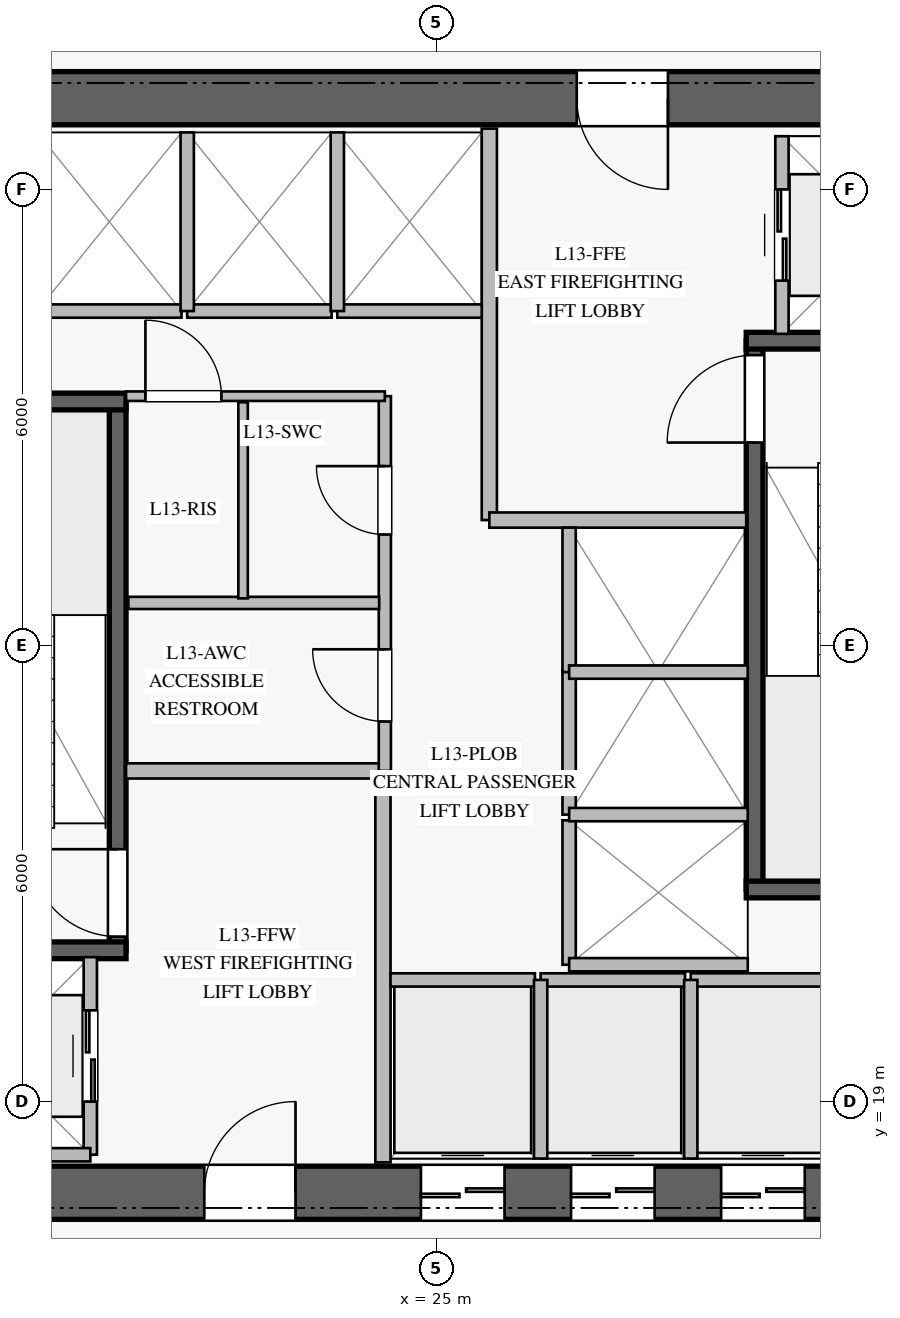
"""IFC4 building model, lengths in metres.
Left out: names, types, materials, properties, quantities, classifications, styles, units other than length and angle.
Written with IfcOpenShell. Run it as: python <this file> out.ifc"""

import sys

from ifc_helpers import new_model, si_unit, direction, frame, frame_2d, origin, place, context, subcontext, project, spatial, rectangle, extrude, element, fill, save


model = new_model("IFC4")
c1 = context("Model", 3, precision=1e-05, world=origin(), true_north=direction((0.0, 1.0)))
c2 = subcontext(c1, "Body", "Model", "MODEL_VIEW")
j1 = project(units=[si_unit("LENGTHUNIT", "METRE"), si_unit("PLANEANGLEUNIT", "RADIAN")], contexts=[c1])
p1 = place(None, origin())
s1 = spatial("IfcSite", under=j1, at=p1, CompositionType="ELEMENT")
p2 = place(p1, origin())
s2 = spatial("IfcBuilding", under=s1, at=p2, CompositionType="ELEMENT")
p3 = place(p2, frame((0.0, 0.0, 56.0)))
s3 = spatial("IfcBuildingStorey", under=s2, at=p3, CompositionType="ELEMENT", Elevation=56.0)
p4 = place(p3, frame((16.85, 17.8, 0.0), z_axis=(0.0, 0.0, 1.0), x_axis=(1.0, 0.0, 0.0)))
e1 = element("IfcWall", 1, at=p4, inside=s3, PredefinedType="SHEAR", context=c2, shape_type="SweptSolid", body=[
    extrude(rectangle(XDim=16.3, YDim=0.7, at=frame_2d((8.15, 0.0))), origin(), (0.0, 0.0, 1.0), 3.76),
])
p5 = place(p4, frame((5.1, 0.0, 0.0)))
e2 = element("IfcOpeningElement", 2, at=p5, cuts=e1, PredefinedType="OPENING", context=c2, shape_type="SweptSolid", body=[
    extrude(rectangle(XDim=1.2, YDim=2.25, at=frame_2d((0.6, 1.125))), frame((0.0, 0.36, 0.0), z_axis=(0.0, -1.0, 0.0), x_axis=(1.0, 0.0, 0.0)), (0.0, 0.0, 1.0), 0.72),
])
p6 = place(p4, frame((14.05, 0.0, 0.0)))
e3 = element("IfcOpeningElement", 3, at=p6, cuts=e1, PredefinedType="OPENING", context=c2, shape_type="SweptSolid", body=[
    extrude(rectangle(XDim=0.9, YDim=2.1, at=frame_2d((0.45, 1.05))), frame((0.0, 0.36, 0.0), z_axis=(0.0, -1.0, 0.0), x_axis=(1.0, 0.0, 0.0)), (0.0, 0.0, 1.0), 0.72),
])
p7 = place(p4, frame((7.95, 0.0, 0.0)))
e4 = element("IfcOpeningElement", 4, at=p7, cuts=e1, PredefinedType="OPENING", context=c2, shape_type="SweptSolid", body=[
    extrude(rectangle(XDim=1.1, YDim=2.2, at=frame_2d((0.55, 1.1))), frame((0.0, 0.36, 0.0), z_axis=(0.0, -1.0, 0.0), x_axis=(1.0, 0.0, 0.0)), (0.0, 0.0, 1.0), 0.72),
])
p8 = place(p4, frame((9.925, 0.0, 0.0)))
e5 = element("IfcOpeningElement", 5, at=p8, cuts=e1, PredefinedType="OPENING", context=c2, shape_type="SweptSolid", body=[
    extrude(rectangle(XDim=1.1, YDim=2.2, at=frame_2d((0.55, 1.1))), frame((0.0, 0.36, 0.0), z_axis=(0.0, -1.0, 0.0), x_axis=(1.0, 0.0, 0.0)), (0.0, 0.0, 1.0), 0.72),
])
p9 = place(p4, frame((11.9, 0.0, 0.0)))
e6 = element("IfcOpeningElement", 6, at=p9, cuts=e1, PredefinedType="OPENING", context=c2, shape_type="SweptSolid", body=[
    extrude(rectangle(XDim=1.1, YDim=2.2, at=frame_2d((0.55, 1.1))), frame((0.0, 0.36, 0.0), z_axis=(0.0, -1.0, 0.0), x_axis=(1.0, 0.0, 0.0)), (0.0, 0.0, 1.0), 0.72),
])
p10 = place(p3, frame((33.15, 32.2, 0.0), z_axis=(0.0, 0.0, 1.0), x_axis=(-1.0, 0.0, 0.0)))
e7 = element("IfcWall", 7, at=p10, inside=s3, PredefinedType="SHEAR", context=c2, shape_type="SweptSolid", body=[
    extrude(rectangle(XDim=16.3, YDim=0.7, at=frame_2d((8.15, 0.0))), origin(), (0.0, 0.0, 1.0), 3.76),
])
p11 = place(p10, frame((5.1, 0.0, 0.0)))
e8 = element("IfcOpeningElement", 8, at=p11, cuts=e7, PredefinedType="OPENING", context=c2, shape_type="SweptSolid", body=[
    extrude(rectangle(XDim=1.2, YDim=2.25, at=frame_2d((0.6, 1.125))), frame((0.0, 0.36, 0.0), z_axis=(0.0, -1.0, 0.0), x_axis=(1.0, 0.0, 0.0)), (0.0, 0.0, 1.0), 0.72),
])
p12 = place(p3, frame((20.81, 20.99, 0.0), z_axis=(0.0, 0.0, 1.0), x_axis=(0.0, 1.0, 0.0)))
e9 = element("IfcWall", 9, at=p12, inside=s3, PredefinedType="SOLIDWALL", context=c2, shape_type="SweptSolid", body=[
    extrude(rectangle(XDim=7.22, YDim=0.22, at=frame_2d((3.61, 0.0))), origin(), (0.0, 0.0, 1.0), 3.76),
])
p13 = place(p12, frame((0.18, 0.0, 0.0)))
e10 = element("IfcOpeningElement", 10, at=p13, cuts=e9, PredefinedType="OPENING", context=c2, shape_type="SweptSolid", body=[
    extrude(rectangle(XDim=1.15, YDim=2.2, at=frame_2d((0.575, 1.1))), frame((0.0, 0.12, 0.0), z_axis=(0.0, -1.0, 0.0), x_axis=(1.0, 0.0, 0.0)), (0.0, 0.0, 1.0), 0.24),
])
for number, where, z_axis, x_axis in (
    (11, (17.2, 20.99, 0.0), (0.0, 0.0, 1.0), (1.0, 0.0, 0.0)),
    (12, (17.2, 28.21, 0.0), (0.0, 0.0, 1.0), (1.0, 0.0, 0.0)),
):
    element("IfcWall", number, at=place(p3, frame(where, z_axis=z_axis, x_axis=x_axis)), inside=s3, PredefinedType="SOLIDWALL", context=c2, shape_type="SweptSolid", body=[
        extrude(rectangle(XDim=3.72, YDim=0.22, at=frame_2d((1.86, 0.0))), origin(), (0.0, 0.0, 1.0), 3.76),
    ])
p14 = place(p3, frame((29.19, 21.79, 0.0), z_axis=(0.0, 0.0, 1.0), x_axis=(0.0, 1.0, 0.0)))
e13 = element("IfcWall", 13, at=p14, inside=s3, PredefinedType="SOLIDWALL", context=c2, shape_type="SweptSolid", body=[
    extrude(rectangle(XDim=7.22, YDim=0.22, at=frame_2d((3.61, 0.0))), origin(), (0.0, 0.0, 1.0), 3.76),
])
p15 = place(p14, frame((5.88, 0.0, 0.0)))
e14 = element("IfcOpeningElement", 14, at=p15, cuts=e13, PredefinedType="OPENING", context=c2, shape_type="SweptSolid", body=[
    extrude(rectangle(XDim=1.15, YDim=2.2, at=frame_2d((0.575, 1.1))), frame((0.0, 0.12, 0.0), z_axis=(0.0, -1.0, 0.0), x_axis=(1.0, 0.0, 0.0)), (0.0, 0.0, 1.0), 0.24),
])
for number, where, z_axis, x_axis in (
    (15, (29.08, 21.79, 0.0), (0.0, 0.0, 1.0), (1.0, 0.0, 0.0)),
    (16, (29.08, 29.01, 0.0), (0.0, 0.0, 1.0), (1.0, 0.0, 0.0)),
):
    element("IfcWall", number, at=place(p3, frame(where, z_axis=z_axis, x_axis=x_axis)), inside=s3, PredefinedType="SOLIDWALL", context=c2, shape_type="SweptSolid", body=[
        extrude(rectangle(XDim=3.72, YDim=0.22, at=frame_2d((1.86, 0.0))), origin(), (0.0, 0.0, 1.0), 3.76),
    ])
p16 = place(p3, frame((24.3, 18.2, 0.0), z_axis=(0.0, 0.0, 1.0), x_axis=(0.0, 1.0, 0.0)))
e17 = element("IfcWall", 17, at=p16, inside=s3, PredefinedType="PARTITIONING", context=c2, shape_type="SweptSolid", body=[
    extrude(rectangle(XDim=5.15, YDim=0.2, at=frame_2d((2.575, 0.0))), origin(), (0.0, 0.0, 1.0), 3.76),
])
p17 = place(p3, frame((20.92, 23.35, 0.0), z_axis=(0.0, 0.0, 1.0), x_axis=(1.0, 0.0, 0.0)))
e18 = element("IfcWall", 18, at=p17, inside=s3, PredefinedType="PARTITIONING", context=c2, shape_type="SweptSolid", body=[
    extrude(rectangle(XDim=3.38, YDim=0.2, at=frame_2d((1.69, 0.0))), origin(), (0.0, 0.0, 1.0), 3.76),
])
p18 = place(p3, frame((25.7, 26.65, 0.0), z_axis=(0.0, 0.0, 1.0), x_axis=(0.0, 1.0, 0.0)))
e19 = element("IfcWall", 19, at=p18, inside=s3, PredefinedType="PARTITIONING", context=c2, shape_type="SweptSolid", body=[
    extrude(rectangle(XDim=5.15, YDim=0.2, at=frame_2d((2.575, 0.0))), origin(), (0.0, 0.0, 1.0), 3.76),
])
p19 = place(p3, frame((25.7, 26.65, 0.0), z_axis=(0.0, 0.0, 1.0), x_axis=(1.0, 0.0, 0.0)))
e20 = element("IfcWall", 20, at=p19, inside=s3, PredefinedType="PARTITIONING", context=c2, shape_type="SweptSolid", body=[
    extrude(rectangle(XDim=3.38, YDim=0.2, at=frame_2d((1.69, 0.0))), origin(), (0.0, 0.0, 1.0), 3.76),
])
p20 = place(p3, frame((24.325, 23.35, 0.0), z_axis=(0.0, 0.0, 1.0), x_axis=(0.0, 1.0, 0.0)))
e21 = element("IfcWall", 21, at=p20, inside=s3, PredefinedType="PLUMBINGWALL", context=c2, shape_type="SweptSolid", body=[
    extrude(rectangle(XDim=4.93, YDim=0.16, at=frame_2d((2.465, 0.0))), origin(), (0.0, 0.0, 1.0), 3.76),
])
p21 = place(p20, frame((0.65, 0.0, 0.0)))
e22 = element("IfcOpeningElement", 22, at=p21, cuts=e21, PredefinedType="OPENING", context=c2, shape_type="SweptSolid", body=[
    extrude(rectangle(XDim=0.95, YDim=2.1, at=frame_2d((0.475, 1.05))), frame((0.0, 0.09, 0.0), z_axis=(0.0, -1.0, 0.0), x_axis=(1.0, 0.0, 0.0)), (0.0, 0.0, 1.0), 0.18),
])
p22 = place(p20, frame((3.11, 0.0, 0.0)))
e23 = element("IfcOpeningElement", 23, at=p22, cuts=e21, PredefinedType="OPENING", context=c2, shape_type="SweptSolid", body=[
    extrude(rectangle(XDim=0.9, YDim=2.1, at=frame_2d((0.45, 1.05))), frame((0.0, 0.09, 0.0), z_axis=(0.0, -1.0, 0.0), x_axis=(1.0, 0.0, 0.0)), (0.0, 0.0, 1.0), 0.18),
])
p23 = place(p3, frame((20.92, 28.28, 0.0), z_axis=(0.0, 0.0, 1.0), x_axis=(1.0, 0.0, 0.0)))
e24 = element("IfcWall", 24, at=p23, inside=s3, PredefinedType="PARTITIONING", context=c2, shape_type="SweptSolid", body=[
    extrude(rectangle(XDim=3.405, YDim=0.125, at=frame_2d((1.703, 0.0))), origin(), (0.0, 0.0, 1.0), 3.76),
])
p24 = place(p23, frame((0.255, 0.0, 0.0)))
e25 = element("IfcOpeningElement", 25, at=p24, cuts=e24, PredefinedType="OPENING", context=c2, shape_type="SweptSolid", body=[
    extrude(rectangle(XDim=1.0, YDim=2.15, at=frame_2d((0.5, 1.075))), frame((0.0, 0.073, 0.0), z_axis=(0.0, -1.0, 0.0), x_axis=(1.0, 0.0, 0.0)), (0.0, 0.0, 1.0), 0.145),
])
p25 = place(p3, frame((20.95, 25.56, 0.0), z_axis=(0.0, 0.0, 1.0), x_axis=(1.0, 0.0, 0.0)))
e26 = element("IfcWall", 26, at=p25, inside=s3, PredefinedType="PLUMBINGWALL", context=c2, shape_type="SweptSolid", body=[
    extrude(rectangle(XDim=3.3, YDim=0.16, at=frame_2d((1.65, 0.0))), origin(), (0.0, 0.0, 1.0), 3.76),
])
p26 = place(p3, frame((22.46, 25.62, 0.0), z_axis=(0.0, 0.0, 1.0), x_axis=(0.0, 1.0, 0.0)))
e27 = element("IfcWall", 27, at=p26, inside=s3, PredefinedType="PARTITIONING", context=c2, shape_type="SweptSolid", body=[
    extrude(rectangle(XDim=2.58, YDim=0.125, at=frame_2d((1.29, 0.0))), origin(), (0.0, 0.0, 1.0), 3.76),
])
p27 = place(p3, frame((24.4, 20.6, 0.0), z_axis=(0.0, 0.0, 1.0), x_axis=(1.0, 0.0, 0.0)))
e28 = element("IfcWall", 28, at=p27, inside=s3, PredefinedType="PARTITIONING", context=c2, shape_type="SweptSolid", body=[
    extrude(rectangle(XDim=1.9, YDim=0.175, at=frame_2d((0.95, 0.0))), origin(), (0.0, 0.0, 1.0), 3.76),
])
p28 = place(p3, frame((26.375, 20.6, 0.0), z_axis=(0.0, 0.0, 1.0), x_axis=(1.0, 0.0, 0.0)))
e29 = element("IfcWall", 29, at=p28, inside=s3, PredefinedType="PARTITIONING", context=c2, shape_type="SweptSolid", body=[
    extrude(rectangle(XDim=1.9, YDim=0.175, at=frame_2d((0.95, 0.0))), origin(), (0.0, 0.0, 1.0), 3.76),
])
p29 = place(p3, frame((26.375, 18.25, 0.0), z_axis=(0.0, 0.0, 1.0), x_axis=(0.0, 1.0, 0.0)))
e30 = element("IfcWall", 30, at=p29, inside=s3, PredefinedType="PARTITIONING", context=c2, shape_type="SweptSolid", body=[
    extrude(rectangle(XDim=2.35, YDim=0.175, at=frame_2d((1.175, 0.0))), origin(), (0.0, 0.0, 1.0), 3.76),
])
p30 = place(p3, frame((28.35, 20.6, 0.0), z_axis=(0.0, 0.0, 1.0), x_axis=(1.0, 0.0, 0.0)))
e31 = element("IfcWall", 31, at=p30, inside=s3, PredefinedType="PARTITIONING", context=c2, shape_type="SweptSolid", body=[
    extrude(rectangle(XDim=1.9, YDim=0.175, at=frame_2d((0.95, 0.0))), origin(), (0.0, 0.0, 1.0), 3.76),
])
p31 = place(p3, frame((28.35, 18.25, 0.0), z_axis=(0.0, 0.0, 1.0), x_axis=(0.0, 1.0, 0.0)))
e32 = element("IfcWall", 32, at=p31, inside=s3, PredefinedType="PARTITIONING", context=c2, shape_type="SweptSolid", body=[
    extrude(rectangle(XDim=2.35, YDim=0.175, at=frame_2d((1.175, 0.0))), origin(), (0.0, 0.0, 1.0), 3.76),
])
for number, where, z_axis, x_axis in (
    (33, (19.75, 29.4, 0.0), (0.0, 0.0, 1.0), (1.0, 0.0, 0.0)),
    (34, (21.725, 29.4, 0.0), (0.0, 0.0, 1.0), (1.0, 0.0, 0.0)),
):
    element("IfcWall", number, at=place(p3, frame(where, z_axis=z_axis, x_axis=x_axis)), inside=s3, PredefinedType="PARTITIONING", context=c2, shape_type="SweptSolid", body=[
        extrude(rectangle(XDim=1.9, YDim=0.175, at=frame_2d((0.95, 0.0))), origin(), (0.0, 0.0, 1.0), 3.76),
    ])
p32 = place(p3, frame((21.725, 29.4, 0.0), z_axis=(0.0, 0.0, 1.0), x_axis=(0.0, 1.0, 0.0)))
e35 = element("IfcWall", 35, at=p32, inside=s3, PredefinedType="PARTITIONING", context=c2, shape_type="SweptSolid", body=[
    extrude(rectangle(XDim=2.35, YDim=0.175, at=frame_2d((1.175, 0.0))), origin(), (0.0, 0.0, 1.0), 3.76),
])
p33 = place(p3, frame((23.7, 29.4, 0.0), z_axis=(0.0, 0.0, 1.0), x_axis=(1.0, 0.0, 0.0)))
e36 = element("IfcWall", 36, at=p33, inside=s3, PredefinedType="PARTITIONING", context=c2, shape_type="SweptSolid", body=[
    extrude(rectangle(XDim=1.9, YDim=0.175, at=frame_2d((0.95, 0.0))), origin(), (0.0, 0.0, 1.0), 3.76),
])
p34 = place(p3, frame((23.7, 29.4, 0.0), z_axis=(0.0, 0.0, 1.0), x_axis=(0.0, 1.0, 0.0)))
e37 = element("IfcWall", 37, at=p34, inside=s3, PredefinedType="PARTITIONING", context=c2, shape_type="SweptSolid", body=[
    extrude(rectangle(XDim=2.35, YDim=0.175, at=frame_2d((1.175, 0.0))), origin(), (0.0, 0.0, 1.0), 3.76),
])
p35 = place(p3, frame((26.75, 20.8, 0.0), z_axis=(0.0, 0.0, 1.0), x_axis=(0.0, 1.0, 0.0)))
e38 = element("IfcWall", 38, at=p35, inside=s3, PredefinedType="PARTITIONING", context=c2, shape_type="SweptSolid", body=[
    extrude(rectangle(XDim=1.9, YDim=0.175, at=frame_2d((0.95, 0.0))), origin(), (0.0, 0.0, 1.0), 3.76),
])
p36 = place(p3, frame((26.75, 20.8, 0.0), z_axis=(0.0, 0.0, 1.0), x_axis=(1.0, 0.0, 0.0)))
e39 = element("IfcWall", 39, at=p36, inside=s3, PredefinedType="PARTITIONING", context=c2, shape_type="SweptSolid", body=[
    extrude(rectangle(XDim=2.35, YDim=0.175, at=frame_2d((1.175, 0.0))), origin(), (0.0, 0.0, 1.0), 3.76),
])
p37 = place(p3, frame((26.75, 22.775, 0.0), z_axis=(0.0, 0.0, 1.0), x_axis=(0.0, 1.0, 0.0)))
e40 = element("IfcWall", 40, at=p37, inside=s3, PredefinedType="PARTITIONING", context=c2, shape_type="SweptSolid", body=[
    extrude(rectangle(XDim=1.9, YDim=0.175, at=frame_2d((0.95, 0.0))), origin(), (0.0, 0.0, 1.0), 3.76),
])
p38 = place(p3, frame((26.75, 22.775, 0.0), z_axis=(0.0, 0.0, 1.0), x_axis=(1.0, 0.0, 0.0)))
e41 = element("IfcWall", 41, at=p38, inside=s3, PredefinedType="PARTITIONING", context=c2, shape_type="SweptSolid", body=[
    extrude(rectangle(XDim=2.35, YDim=0.175, at=frame_2d((1.175, 0.0))), origin(), (0.0, 0.0, 1.0), 3.76),
])
p39 = place(p3, frame((26.75, 24.65, 0.0), z_axis=(0.0, 0.0, 1.0), x_axis=(0.0, 1.0, 0.0)))
e42 = element("IfcWall", 42, at=p39, inside=s3, PredefinedType="PARTITIONING", context=c2, shape_type="SweptSolid", body=[
    extrude(rectangle(XDim=1.9, YDim=0.175, at=frame_2d((0.95, 0.0))), origin(), (0.0, 0.0, 1.0), 3.76),
])
p40 = place(p3, frame((26.75, 24.65, 0.0), z_axis=(0.0, 0.0, 1.0), x_axis=(1.0, 0.0, 0.0)))
e43 = element("IfcWall", 43, at=p40, inside=s3, PredefinedType="PARTITIONING", context=c2, shape_type="SweptSolid", body=[
    extrude(rectangle(XDim=2.35, YDim=0.175, at=frame_2d((1.175, 0.0))), origin(), (0.0, 0.0, 1.0), 3.76),
])
p41 = place(p3, frame((20.45, 18.3, 0.0), z_axis=(0.0, 0.0, 1.0), x_axis=(0.0, 1.0, 0.0)))
e44 = element("IfcWall", 44, at=p41, inside=s3, PredefinedType="PARTITIONING", context=c2, shape_type="SweptSolid", body=[
    extrude(rectangle(XDim=2.6, YDim=0.175, at=frame_2d((1.3, 0.0))), origin(), (0.0, 0.0, 1.0), 3.76),
])
p42 = place(p41, frame((0.7, 0.0, 0.0)))
e45 = element("IfcOpeningElement", 45, at=p42, cuts=e44, PredefinedType="OPENING", context=c2, shape_type="SweptSolid", body=[
    extrude(rectangle(XDim=1.2, YDim=2.2, at=frame_2d((0.6, 1.1))), frame((0.0, 0.098, 0.0), z_axis=(0.0, -1.0, 0.0), x_axis=(1.0, 0.0, 0.0)), (0.0, 0.0, 1.0), 0.195),
])
p43 = place(p3, frame((17.85, 18.3, 0.0), z_axis=(0.0, 0.0, 1.0), x_axis=(1.0, 0.0, 0.0)))
e46 = element("IfcWall", 46, at=p43, inside=s3, PredefinedType="PARTITIONING", context=c2, shape_type="SweptSolid", body=[
    extrude(rectangle(XDim=2.6, YDim=0.175, at=frame_2d((1.3, 0.0))), origin(), (0.0, 0.0, 1.0), 3.76),
])
p44 = place(p3, frame((29.55, 29.1, 0.0), z_axis=(0.0, 0.0, 1.0), x_axis=(0.0, 1.0, 0.0)))
e47 = element("IfcWall", 47, at=p44, inside=s3, PredefinedType="PARTITIONING", context=c2, shape_type="SweptSolid", body=[
    extrude(rectangle(XDim=2.6, YDim=0.175, at=frame_2d((1.3, 0.0))), origin(), (0.0, 0.0, 1.0), 3.76),
])
p45 = place(p44, frame((0.7, 0.0, 0.0)))
e48 = element("IfcOpeningElement", 48, at=p45, cuts=e47, PredefinedType="OPENING", context=c2, shape_type="SweptSolid", body=[
    extrude(rectangle(XDim=1.2, YDim=2.2, at=frame_2d((0.6, 1.1))), frame((0.0, 0.098, 0.0), z_axis=(0.0, -1.0, 0.0), x_axis=(1.0, 0.0, 0.0)), (0.0, 0.0, 1.0), 0.195),
])
p46 = place(p13, origin())
e49 = element("IfcDoor", 49, at=p46, inside=s3, OperationType="SINGLE_SWING_RIGHT", PredefinedType="DOOR", context=c2, shape_type="SweptSolid", body=[
    extrude(rectangle(XDim=1.15, YDim=2.2, at=frame_2d((0.575, 1.1))), frame((0.0, 0.025, 0.0), z_axis=(0.0, -1.0, 0.0), x_axis=(1.0, 0.0, 0.0)), (0.0, 0.0, 1.0), 0.05),
])
fill(e10, e49)
p47 = place(p15, origin())
e50 = element("IfcDoor", 50, at=p47, inside=s3, OperationType="SINGLE_SWING_LEFT", PredefinedType="DOOR", context=c2, shape_type="SweptSolid", body=[
    extrude(rectangle(XDim=1.15, YDim=2.2, at=frame_2d((0.575, 1.1))), frame((0.0, 0.025, 0.0), z_axis=(0.0, -1.0, 0.0), x_axis=(1.0, 0.0, 0.0)), (0.0, 0.0, 1.0), 0.05),
])
fill(e14, e50)
p48 = place(p5, origin())
e51 = element("IfcDoor", 51, at=p48, inside=s3, OperationType="SINGLE_SWING_RIGHT", PredefinedType="DOOR", context=c2, shape_type="SweptSolid", body=[
    extrude(rectangle(XDim=1.2, YDim=2.25, at=frame_2d((0.6, 1.125))), frame((0.0, 0.025, 0.0), z_axis=(0.0, -1.0, 0.0), x_axis=(1.0, 0.0, 0.0)), (0.0, 0.0, 1.0), 0.05),
])
fill(e2, e51)
p49 = place(p11, origin())
e52 = element("IfcDoor", 52, at=p49, inside=s3, OperationType="SINGLE_SWING_LEFT", PredefinedType="DOOR", context=c2, shape_type="SweptSolid", body=[
    extrude(rectangle(XDim=1.2, YDim=2.25, at=frame_2d((0.6, 1.125))), frame((0.0, 0.025, 0.0), z_axis=(0.0, -1.0, 0.0), x_axis=(1.0, 0.0, 0.0)), (0.0, 0.0, 1.0), 0.05),
])
fill(e8, e52)
p50 = place(p21, origin())
e53 = element("IfcDoor", 53, at=p50, inside=s3, OperationType="SINGLE_SWING_RIGHT", PredefinedType="DOOR", context=c2, shape_type="SweptSolid", body=[
    extrude(rectangle(XDim=0.95, YDim=2.1, at=frame_2d((0.475, 1.05))), frame((0.0, 0.025, 0.0), z_axis=(0.0, -1.0, 0.0), x_axis=(1.0, 0.0, 0.0)), (0.0, 0.0, 1.0), 0.05),
])
fill(e22, e53)
p51 = place(p24, origin())
e54 = element("IfcDoor", 54, at=p51, inside=s3, OperationType="SINGLE_SWING_LEFT", PredefinedType="DOOR", context=c2, shape_type="SweptSolid", body=[
    extrude(rectangle(XDim=1.0, YDim=2.15, at=frame_2d((0.5, 1.075))), frame((0.0, 0.025, 0.0), z_axis=(0.0, -1.0, 0.0), x_axis=(1.0, 0.0, 0.0)), (0.0, 0.0, 1.0), 0.05),
])
fill(e25, e54)
p52 = place(p22, origin())
e55 = element("IfcDoor", 55, at=p52, inside=s3, OperationType="SINGLE_SWING_RIGHT", PredefinedType="DOOR", context=c2, shape_type="SweptSolid", body=[
    extrude(rectangle(XDim=0.9, YDim=2.1, at=frame_2d((0.45, 1.05))), frame((0.0, 0.025, 0.0), z_axis=(0.0, -1.0, 0.0), x_axis=(1.0, 0.0, 0.0)), (0.0, 0.0, 1.0), 0.05),
])
fill(e23, e55)
p53 = place(p7, origin())
e56 = element("IfcDoor", 56, at=p53, inside=s3, OperationType="DOUBLE_DOOR_SLIDING", PredefinedType="DOOR", context=c2, shape_type="SweptSolid", body=[
    extrude(rectangle(XDim=1.1, YDim=2.2, at=frame_2d((0.55, 1.1))), frame((0.0, 0.025, 0.0), z_axis=(0.0, -1.0, 0.0), x_axis=(1.0, 0.0, 0.0)), (0.0, 0.0, 1.0), 0.05),
])
fill(e4, e56)
p54 = place(p8, origin())
e57 = element("IfcDoor", 57, at=p54, inside=s3, OperationType="DOUBLE_DOOR_SLIDING", PredefinedType="DOOR", context=c2, shape_type="SweptSolid", body=[
    extrude(rectangle(XDim=1.1, YDim=2.2, at=frame_2d((0.55, 1.1))), frame((0.0, 0.025, 0.0), z_axis=(0.0, -1.0, 0.0), x_axis=(1.0, 0.0, 0.0)), (0.0, 0.0, 1.0), 0.05),
])
fill(e5, e57)
p55 = place(p9, origin())
e58 = element("IfcDoor", 58, at=p55, inside=s3, OperationType="DOUBLE_DOOR_SLIDING", PredefinedType="DOOR", context=c2, shape_type="SweptSolid", body=[
    extrude(rectangle(XDim=1.1, YDim=2.2, at=frame_2d((0.55, 1.1))), frame((0.0, 0.025, 0.0), z_axis=(0.0, -1.0, 0.0), x_axis=(1.0, 0.0, 0.0)), (0.0, 0.0, 1.0), 0.05),
])
fill(e6, e58)
p56 = place(p42, origin())
e59 = element("IfcDoor", 59, at=p56, inside=s3, OperationType="DOUBLE_DOOR_SLIDING", PredefinedType="DOOR", context=c2, shape_type="SweptSolid", body=[
    extrude(rectangle(XDim=1.2, YDim=2.2, at=frame_2d((0.6, 1.1))), frame((0.0, 0.025, 0.0), z_axis=(0.0, -1.0, 0.0), x_axis=(1.0, 0.0, 0.0)), (0.0, 0.0, 1.0), 0.05),
])
fill(e45, e59)
p57 = place(p45, origin())
e60 = element("IfcDoor", 60, at=p57, inside=s3, OperationType="DOUBLE_DOOR_SLIDING", PredefinedType="DOOR", context=c2, shape_type="SweptSolid", body=[
    extrude(rectangle(XDim=1.2, YDim=2.2, at=frame_2d((0.6, 1.1))), frame((0.0, 0.025, 0.0), z_axis=(0.0, -1.0, 0.0), x_axis=(1.0, 0.0, 0.0)), (0.0, 0.0, 1.0), 0.05),
])
fill(e48, e60)
save(model, sys.argv[1])
